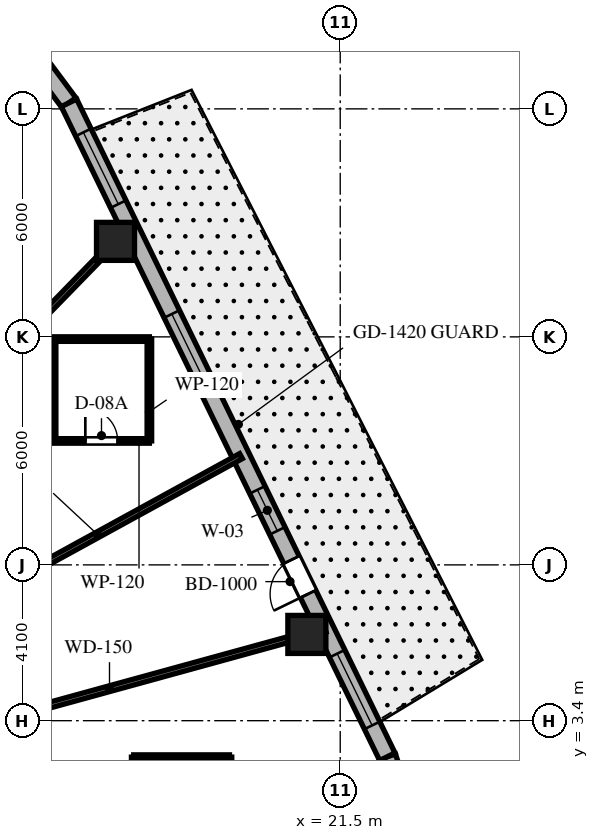
"""IFC4 building model, lengths in metres.
Left out: names, types, materials, properties, quantities, classifications, styles, units other than length and angle.
Written with IfcOpenShell. Run it as: python <this file> out.ifc"""

import sys

from ifc_helpers import new_model, si_unit, direction, frame, frame_2d, origin, origin_2d, place, context, subcontext, project, spatial, rectangle, extrude, element, fill, save


model = new_model("IFC4")
c1 = context("Model", 3, precision=1e-05, world=origin(), true_north=direction((0.0, 1.0)))
c2 = subcontext(c1, "Body", "Model", "MODEL_VIEW")
j1 = project(units=[si_unit("LENGTHUNIT", "METRE"), si_unit("PLANEANGLEUNIT", "RADIAN")], contexts=[c1])
p1 = place(None, origin())
s1 = spatial("IfcSite", under=j1, at=p1, CompositionType="ELEMENT")
p2 = place(p1, origin())
s2 = spatial("IfcBuilding", under=s1, at=p2, CompositionType="ELEMENT")
p3 = place(p2, frame((0.0, 0.0, 244.5)))
s3 = spatial("IfcBuildingStorey", under=s2, at=p3, CompositionType="ELEMENT", Elevation=244.5)
for number, where, z_axis, x_axis in (
    (1, (20.622, 5.67, 0.0), (0.0, 0.0, 1.0), (1.0, 0.0, 0.0)),
    (2, (15.587, 16.013, 0.0), (0.0, 0.0, 1.0), (1.0, 0.0, 0.0)),
):
    element("IfcColumn", number, at=place(p3, frame(where, z_axis=z_axis, x_axis=x_axis)), inside=s3, PredefinedType="COLUMN", context=c2, shape_type="SweptSolid", body=[
        extrude(rectangle(XDim=1.0, YDim=1.0, at=origin_2d()), origin(), (0.0, 0.0, 1.0), 3.8),
    ])
p4 = place(p3, frame((23.023, 1.604, 0.0), z_axis=(0.0, 0.0, 1.0), x_axis=(-0.316801227695, 0.948491951537, 0.0)))
e3 = element("IfcWall", 3, at=p4, inside=s3, PredefinedType="SOLIDWALL", context=c2, shape_type="SweptSolid", body=[
    extrude(rectangle(XDim=0.894, YDim=0.45, at=frame_2d((0.447, 0.0))), origin(), (0.0, 0.0, 1.0), 3.5),
])
p5 = place(p3, frame((14.362, 19.658, 0.0), z_axis=(0.0, 0.0, 1.0), x_axis=(-0.596642462792, 0.80250717853, 0.0)))
e4 = element("IfcWall", 4, at=p5, inside=s3, PredefinedType="SOLIDWALL", context=c2, shape_type="SweptSolid", body=[
    extrude(rectangle(XDim=1.27, YDim=0.45, at=frame_2d((0.635, 0.0))), origin(), (0.0, 0.0, 1.0), 3.5),
])
p6 = place(p3, frame((22.74, 2.452, 0.0), z_axis=(0.0, 0.0, 1.0), x_axis=(-0.437753424814, 0.899095066755, 0.0)))
e5 = element("IfcWall", 5, at=p6, inside=s3, PredefinedType="SOLIDWALL", context=c2, shape_type="SweptSolid", body=[
    extrude(rectangle(XDim=19.137, YDim=0.45, at=frame_2d((9.569, 0.0))), origin(), (0.0, 0.0, 1.0), 3.5),
])
p7 = place(p6, frame((4.763, 0.0, 0.0)))
e6 = element("IfcOpeningElement", 6, at=p7, cuts=e5, PredefinedType="OPENING", context=c2, shape_type="SweptSolid", body=[
    extrude(rectangle(XDim=1.0, YDim=2.15, at=frame_2d((0.5, 1.075))), frame((0.0, 0.235, 0.0), z_axis=(0.0, -1.0, 0.0), x_axis=(1.0, 0.0, 0.0)), (0.0, 0.0, 1.0), 0.47),
])
p8 = place(p6, frame((6.611, 0.0, 0.8)))
e7 = element("IfcOpeningElement", 7, at=p8, cuts=e5, PredefinedType="OPENING", context=c2, shape_type="SweptSolid", body=[
    extrude(rectangle(XDim=1.2, YDim=1.8, at=frame_2d((0.6, 0.9))), frame((0.0, 0.235, 0.0), z_axis=(0.0, -1.0, 0.0), x_axis=(1.0, 0.0, 0.0)), (0.0, 0.0, 1.0), 0.47),
])
p9 = place(p6, frame((10.856, 0.0, 0.8)))
e8 = element("IfcOpeningElement", 8, at=p9, cuts=e5, PredefinedType="OPENING", context=c2, shape_type="SweptSolid", body=[
    extrude(rectangle(XDim=2.1, YDim=1.85, at=frame_2d((1.05, 0.925))), frame((0.0, 0.235, 0.0), z_axis=(0.0, -1.0, 0.0), x_axis=(1.0, 0.0, 0.0)), (0.0, 0.0, 1.0), 0.47),
])
p10 = place(p6, frame((16.173, 0.0, 0.8)))
e9 = element("IfcOpeningElement", 9, at=p10, cuts=e5, PredefinedType="OPENING", context=c2, shape_type="SweptSolid", body=[
    extrude(rectangle(XDim=2.1, YDim=1.85, at=frame_2d((1.05, 0.925))), frame((0.0, 0.235, 0.0), z_axis=(0.0, -1.0, 0.0), x_axis=(1.0, 0.0, 0.0)), (0.0, 0.0, 1.0), 0.47),
])
p11 = place(p6, frame((0.916, 0.0, 0.8)))
e10 = element("IfcOpeningElement", 10, at=p11, cuts=e5, PredefinedType="OPENING", context=c2, shape_type="SweptSolid", body=[
    extrude(rectangle(XDim=2.1, YDim=1.85, at=frame_2d((1.05, 0.925))), frame((0.0, 0.235, 0.0), z_axis=(0.0, -1.0, 0.0), x_axis=(1.0, 0.0, 0.0)), (0.0, 0.0, 1.0), 0.47),
])
p12 = place(p3, frame((11.35, 3.121, 0.0), z_axis=(0.0, 0.0, 1.0), x_axis=(0.964212793822, 0.265129568758, 0.0)))
e11 = element("IfcWall", 11, at=p12, inside=s3, PredefinedType="PARTITIONING", context=c2, shape_type="SweptSolid", body=[
    extrude(rectangle(XDim=10.12, YDim=0.15, at=frame_2d((5.06, 0.0))), origin(), (0.0, 0.0, 1.0), 2.74),
])
p13 = place(p3, frame((11.35, 6.227, 0.0), z_axis=(0.0, 0.0, 1.0), x_axis=(0.876723190824, 0.480995266786, 0.0)))
e12 = element("IfcWall", 12, at=p13, inside=s3, PredefinedType="PARTITIONING", context=c2, shape_type="SweptSolid", body=[
    extrude(rectangle(XDim=8.598, YDim=0.15, at=frame_2d((4.299, 0.0))), origin(), (0.0, 0.0, 1.0), 2.74),
])
p14 = place(p3, frame((9.588, 9.85, 0.0), z_axis=(0.0, 0.0, 1.0), x_axis=(0.697519469595, 0.716565830567, 0.0)))
e13 = element("IfcWall", 13, at=p14, inside=s3, PredefinedType="PARTITIONING", context=c2, shape_type="SweptSolid", body=[
    extrude(rectangle(XDim=9.126, YDim=0.15, at=frame_2d((4.563, 0.0))), origin(), (0.0, 0.0, 1.0), 2.74),
])
p15 = place(p3, frame((13.958, 10.762, 0.0), z_axis=(0.0, 0.0, 1.0), x_axis=(1.0, 0.0, 0.0)))
e14 = element("IfcWall", 14, at=p15, inside=s3, PredefinedType="PARTITIONING", context=c2, shape_type="SweptSolid", body=[
    extrude(rectangle(XDim=2.52, YDim=0.12, at=frame_2d((1.26, 0.0))), origin(), (0.0, 0.0, 1.0), 3.027),
])
p16 = place(p15, frame((0.835, 0.0, 0.0)))
e15 = element("IfcOpeningElement", 15, at=p16, cuts=e14, PredefinedType="OPENING", context=c2, shape_type="SweptSolid", body=[
    extrude(rectangle(XDim=0.85, YDim=2.03, at=frame_2d((0.425, 1.015))), frame((0.0, 0.07, 0.0), z_axis=(0.0, -1.0, 0.0), x_axis=(1.0, 0.0, 0.0)), (0.0, 0.0, 1.0), 0.14),
])
p17 = place(p3, frame((16.478, 10.762, 0.0), z_axis=(0.0, 0.0, 1.0), x_axis=(0.0, 1.0, 0.0)))
e16 = element("IfcWall", 16, at=p17, inside=s3, PredefinedType="PARTITIONING", context=c2, shape_type="SweptSolid", body=[
    extrude(rectangle(XDim=2.68, YDim=0.12, at=frame_2d((1.34, 0.0))), origin(), (0.0, 0.0, 1.0), 3.5),
])
p18 = place(p3, frame((16.478, 13.442, 0.0), z_axis=(0.0, 0.0, 1.0), x_axis=(-1.0, 0.0, 0.0)))
e17 = element("IfcWall", 17, at=p18, inside=s3, PredefinedType="PARTITIONING", context=c2, shape_type="SweptSolid", body=[
    extrude(rectangle(XDim=2.52, YDim=0.12, at=frame_2d((1.26, 0.0))), origin(), (0.0, 0.0, 1.0), 3.5),
])
p19 = place(p3, frame((13.958, 13.442, 0.0), z_axis=(0.0, 0.0, 1.0), x_axis=(0.0, -1.0, 0.0)))
e18 = element("IfcWall", 18, at=p19, inside=s3, PredefinedType="PARTITIONING", context=c2, shape_type="SweptSolid", body=[
    extrude(rectangle(XDim=2.68, YDim=0.12, at=frame_2d((1.34, 0.0))), origin(), (0.0, 0.0, 1.0), 3.027),
])
p20 = place(p3, frame((18.586, -0.239, 0.0), z_axis=(0.0, 0.0, 1.0), x_axis=(0.0, 1.0, 0.0)))
e19 = element("IfcWall", 19, at=p20, inside=s3, PredefinedType="PARTITIONING", context=c2, shape_type="SweptSolid", body=[
    extrude(rectangle(XDim=2.68, YDim=0.12, at=frame_2d((1.34, 0.0))), origin(), (0.0, 0.0, 1.0), 3.5),
])
p21 = place(p3, frame((18.586, 2.441, 0.0), z_axis=(0.0, 0.0, 1.0), x_axis=(-1.0, 0.0, 0.0)))
e20 = element("IfcWall", 20, at=p21, inside=s3, PredefinedType="PARTITIONING", context=c2, shape_type="SweptSolid", body=[
    extrude(rectangle(XDim=2.52, YDim=0.12, at=frame_2d((1.26, 0.0))), origin(), (0.0, 0.0, 1.0), 2.94),
])
p22 = place(p3, frame((16.066, 2.441, 0.0), z_axis=(0.0, 0.0, 1.0), x_axis=(0.0, -1.0, 0.0)))
e21 = element("IfcWall", 21, at=p22, inside=s3, PredefinedType="PARTITIONING", context=c2, shape_type="SweptSolid", body=[
    extrude(rectangle(XDim=2.68, YDim=0.12, at=frame_2d((1.34, 0.0))), origin(), (0.0, 0.0, 1.0), 3.5),
])
p23 = place(p7, origin())
e22 = element("IfcDoor", 22, at=p23, inside=s3, OperationType="SINGLE_SWING_LEFT", PredefinedType="DOOR", context=c2, shape_type="SweptSolid", body=[
    extrude(rectangle(XDim=1.0, YDim=2.15, at=frame_2d((0.5, 1.075))), frame((0.0, 0.025, 0.0), z_axis=(0.0, -1.0, 0.0), x_axis=(1.0, 0.0, 0.0)), (0.0, 0.0, 1.0), 0.05),
])
fill(e6, e22)
p24 = place(p8, origin())
e23 = element("IfcWindow", 23, at=p24, inside=s3, PartitioningType="SINGLE_PANEL", PredefinedType="WINDOW", context=c2, shape_type="SweptSolid", body=[
    extrude(rectangle(XDim=1.2, YDim=1.8, at=frame_2d((0.6, 0.9))), frame((0.0, 0.03, 0.0), z_axis=(0.0, -1.0, 0.0), x_axis=(1.0, 0.0, 0.0)), (0.0, 0.0, 1.0), 0.06),
])
fill(e7, e23)
p25 = place(p9, origin())
e24 = element("IfcWindow", 24, at=p25, inside=s3, PartitioningType="SINGLE_PANEL", PredefinedType="WINDOW", context=c2, shape_type="SweptSolid", body=[
    extrude(rectangle(XDim=2.1, YDim=1.85, at=frame_2d((1.05, 0.925))), frame((0.0, 0.03, 0.0), z_axis=(0.0, -1.0, 0.0), x_axis=(1.0, 0.0, 0.0)), (0.0, 0.0, 1.0), 0.06),
])
fill(e8, e24)
p26 = place(p10, origin())
e25 = element("IfcWindow", 25, at=p26, inside=s3, PartitioningType="SINGLE_PANEL", PredefinedType="WINDOW", context=c2, shape_type="SweptSolid", body=[
    extrude(rectangle(XDim=2.1, YDim=1.85, at=frame_2d((1.05, 0.925))), frame((0.0, 0.03, 0.0), z_axis=(0.0, -1.0, 0.0), x_axis=(1.0, 0.0, 0.0)), (0.0, 0.0, 1.0), 0.06),
])
fill(e9, e25)
p27 = place(p11, origin())
e26 = element("IfcWindow", 26, at=p27, inside=s3, PartitioningType="SINGLE_PANEL", PredefinedType="WINDOW", context=c2, shape_type="SweptSolid", body=[
    extrude(rectangle(XDim=2.1, YDim=1.85, at=frame_2d((1.05, 0.925))), frame((0.0, 0.03, 0.0), z_axis=(0.0, -1.0, 0.0), x_axis=(1.0, 0.0, 0.0)), (0.0, 0.0, 1.0), 0.06),
])
fill(e10, e26)
p28 = place(p16, origin())
e27 = element("IfcDoor", 27, at=p28, inside=s3, OperationType="SINGLE_SWING_LEFT", PredefinedType="DOOR", context=c2, shape_type="SweptSolid", body=[
    extrude(rectangle(XDim=0.85, YDim=2.03, at=frame_2d((0.425, 1.015))), frame((0.0, 0.025, 0.0), z_axis=(0.0, -1.0, 0.0), x_axis=(1.0, 0.0, 0.0)), (0.0, 0.0, 1.0), 0.05),
])
fill(e15, e27)
save(model, sys.argv[1])
